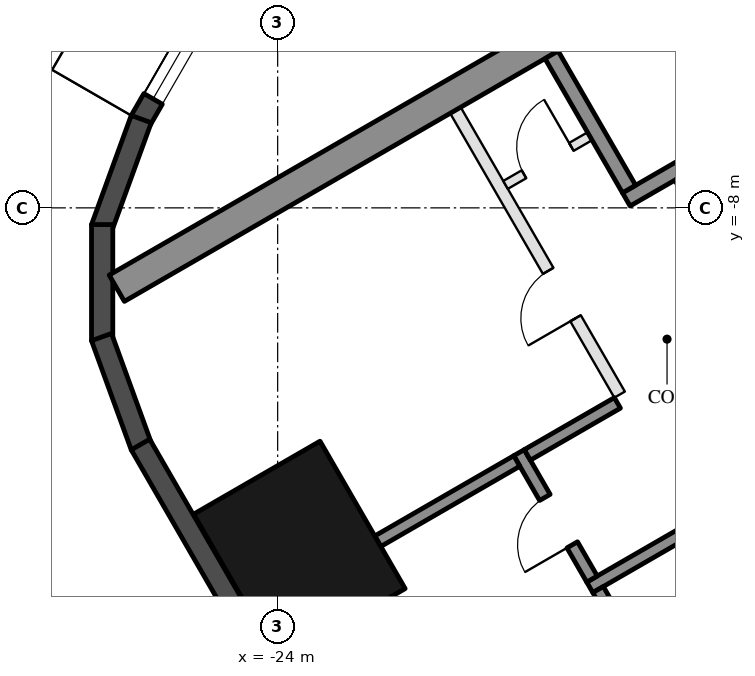
"""IFC4 building model, lengths in metres.
Left out: names, types, materials, properties, quantities, classifications, styles, units other than length and angle.
Written with IfcOpenShell. Run it as: python <this file> out.ifc"""

import sys

from ifc_helpers import new_model, si_unit, direction, frame, frame_2d, origin, origin_2d, place, context, subcontext, project, spatial, rectangle, hollow_rectangle, extrude, element, fill, save


model = new_model("IFC4")
c1 = context("Model", 3, precision=1e-05, world=origin(), true_north=direction((0.0, 1.0)))
c2 = subcontext(c1, "Body", "Model", "MODEL_VIEW")
j1 = project(units=[si_unit("LENGTHUNIT", "METRE"), si_unit("PLANEANGLEUNIT", "RADIAN")], contexts=[c1])
p1 = place(None, origin())
s1 = spatial("IfcSite", under=j1, at=p1, CompositionType="ELEMENT")
p2 = place(p1, origin())
s2 = spatial("IfcBuilding", under=s1, at=p2, CompositionType="ELEMENT")
p3 = place(p2, frame((0.0, 0.0, 109.4)))
s3 = spatial("IfcBuildingStorey", under=s2, at=p3, CompositionType="ELEMENT", Elevation=109.4)
p4 = place(p3, frame((-23.643, -13.65, 0.0), z_axis=(0.0, 0.0, 1.0), x_axis=(-0.5, 0.866025403784, 0.0)))
e1 = element("IfcColumn", 1, at=p4, inside=s3, PredefinedType="COLUMN", context=c2, shape_type="SweptSolid", body=[
    extrude(hollow_rectangle(XDim=2.8, YDim=2.4, WallThickness=0.07, at=origin_2d()), origin(), (0.0, 0.0, 1.0), 3.7),
])
p5 = place(p3, frame((-24.299, -3.176, 0.0), z_axis=(0.0, 0.0, 1.0), x_axis=(-0.500028278809, -0.866009076391, 0.0)))
e2 = element("IfcWall", 2, at=p5, inside=s3, PredefinedType="SOLIDWALL", context=c2, shape_type="SweptSolid", body=[
    extrude(rectangle(XDim=3.916, YDim=0.35, at=frame_2d((1.958, 0.0))), origin(), (0.0, 0.0, 1.0), 3.55),
])
p6 = place(p5, frame((1.7, 0.0, 0.3)))
e3 = element("IfcOpeningElement", 3, at=p6, cuts=e2, PredefinedType="OPENING", context=c2, shape_type="SweptSolid", body=[
    extrude(rectangle(XDim=1.8, YDim=2.65, at=frame_2d((0.9, 1.325))), frame((0.0, 0.185, 0.0), z_axis=(0.0, -1.0, 0.0), x_axis=(1.0, 0.0, 0.0)), (0.0, 0.0, 1.0), 0.37),
])
for number, where, z_axis, x_axis in (
    (4, (-26.244, -6.54, 0.0), (0.0, 0.0, 1.0), (-0.342, -0.94, 0.0)),
    (5, (-26.886, -8.275, 0.0), (0.0, 0.0, 1.0), (0.0, -1.0, 0.0)),
    (6, (-26.897, -10.125, 0.0), (0.0, 0.0, 1.0), (0.342, -0.94, 0.0)),
):
    element("IfcWall", number, at=place(p3, frame(where, z_axis=z_axis, x_axis=x_axis)), inside=s3, PredefinedType="SOLIDWALL", context=c2, shape_type="SweptSolid", body=[
        extrude(rectangle(XDim=1.91, YDim=0.35, at=frame_2d((0.955, 0.0))), origin(), (0.0, 0.0, 1.0), 3.55),
    ])
p7 = place(p3, frame((-26.257, -11.893, 0.0), z_axis=(0.0, 0.0, 1.0), x_axis=(0.500018773155, -0.866014564827, 0.0)))
e7 = element("IfcWall", 7, at=p7, inside=s3, PredefinedType="SOLIDWALL", context=c2, shape_type="SweptSolid", body=[
    extrude(rectangle(XDim=5.658, YDim=0.35, at=frame_2d((2.829, 0.0))), origin(), (0.0, 0.0, 1.0), 3.55),
])
for number, where, z_axis, x_axis in (
    (8, (-13.797, -1.903, 0.0), (0.0, 0.0, 1.0), (-0.866, -0.5, 0.0)),
    (9, (-8.547, -10.997, 0.0), (0.0, 0.0, 1.0), (-0.866, -0.5, 0.0)),
):
    element("IfcWall", number, at=place(p3, frame(where, z_axis=z_axis, x_axis=x_axis)), inside=s3, PredefinedType="SHEAR", context=c2, shape_type="SweptSolid", body=[
        extrude(rectangle(XDim=14.837, YDim=0.5, at=frame_2d((7.418, 0.0))), origin(), (0.0, 0.0, 1.0), 3.5),
    ])
p8 = place(p3, frame((-12.681, -4.636, 0.0), z_axis=(0.0, 0.0, 1.0), x_axis=(-0.866021702275, -0.500006411147, 0.0)))
e10 = element("IfcWall", 10, at=p8, inside=s3, PredefinedType="SHEAR", context=c2, shape_type="SweptSolid", body=[
    extrude(rectangle(XDim=6.45, YDim=0.25, at=frame_2d((3.225, 0.0))), origin(), (0.0, 0.0, 1.0), 3.5),
])
p9 = place(p8, frame((0.3, 0.0, 0.0)))
e11 = element("IfcOpeningElement", 11, at=p9, cuts=e10, PredefinedType="OPENING", context=c2, shape_type="SweptSolid", body=[
    extrude(rectangle(XDim=1.0, YDim=2.1, at=frame_2d((0.5, 1.05))), frame((0.0, 0.135, 0.0), z_axis=(0.0, -1.0, 0.0), x_axis=(1.0, 0.0, 0.0)), (0.0, 0.0, 1.0), 0.27),
])
p10 = place(p3, frame((-19.496, -5.482, 0.0), z_axis=(0.0, 0.0, 1.0), x_axis=(0.499990435942, -0.866030925526, 0.0)))
e12 = element("IfcWall", 12, at=p10, inside=s3, PredefinedType="SHEAR", context=c2, shape_type="SweptSolid", body=[
    extrude(rectangle(XDim=2.55, YDim=0.25, at=frame_2d((1.275, 0.0))), origin(), (0.0, 0.0, 1.0), 3.5),
])
p11 = place(p3, frame((-17.381, -7.495, 0.0), z_axis=(0.0, 0.0, 1.0), x_axis=(0.500011755427, -0.866018616679, 0.0)))
e13 = element("IfcWall", 13, at=p11, inside=s3, PredefinedType="SHEAR", context=c2, shape_type="SweptSolid", body=[
    extrude(rectangle(XDim=2.8, YDim=0.2, at=frame_2d((1.4, 0.0))), origin(), (0.0, 0.0, 1.0), 3.5),
])
p12 = place(p3, frame((-10.068, -9.162, 0.0), z_axis=(0.0, 0.0, 1.0), x_axis=(-0.866032725843, -0.499987317609, 0.0)))
e14 = element("IfcWall", 14, at=p12, inside=s3, PredefinedType="SHEAR", context=c2, shape_type="SweptSolid", body=[
    extrude(rectangle(XDim=10.16, YDim=0.2, at=frame_2d((5.08, 0.0))), origin(), (0.0, 0.0, 1.0), 3.5),
])
p13 = place(p12, frame((1.99, 0.0, 0.0)))
e15 = element("IfcOpeningElement", 15, at=p13, cuts=e14, PredefinedType="OPENING", context=c2, shape_type="SweptSolid", body=[
    extrude(rectangle(XDim=0.9, YDim=2.1, at=frame_2d((0.45, 1.05))), frame((0.0, 0.11, 0.0), z_axis=(0.0, -1.0, 0.0), x_axis=(1.0, 0.0, 0.0)), (0.0, 0.0, 1.0), 0.22),
])
p14 = place(p12, frame((7.07, 0.0, 0.0)))
e16 = element("IfcOpeningElement", 16, at=p14, cuts=e14, PredefinedType="OPENING", context=c2, shape_type="SweptSolid", body=[
    extrude(rectangle(XDim=0.9, YDim=2.1, at=frame_2d((0.45, 1.05))), frame((0.0, 0.11, 0.0), z_axis=(0.0, -1.0, 0.0), x_axis=(1.0, 0.0, 0.0)), (0.0, 0.0, 1.0), 0.22),
])
p15 = place(p3, frame((-20.031, -12.026, 0.0), z_axis=(0.0, 0.0, 1.0), x_axis=(0.500033551112, -0.866006032174, 0.0)))
e17 = element("IfcWall", 17, at=p15, inside=s3, PredefinedType="SHEAR", context=c2, shape_type="SweptSolid", body=[
    extrude(rectangle(XDim=2.4, YDim=0.2, at=frame_2d((1.2, 0.0))), origin(), (0.0, 0.0, 1.0), 3.5),
])
p16 = place(p15, frame((0.85, 0.0, 0.0)))
e18 = element("IfcOpeningElement", 18, at=p16, cuts=e17, PredefinedType="OPENING", context=c2, shape_type="SweptSolid", body=[
    extrude(rectangle(XDim=0.9, YDim=2.1, at=frame_2d((0.45, 1.05))), frame((0.0, 0.11, 0.0), z_axis=(0.0, -1.0, 0.0), x_axis=(1.0, 0.0, 0.0)), (0.0, 0.0, 1.0), 0.22),
])
p17 = place(p3, frame((-18.413, -11.208, 0.0), z_axis=(0.0, 0.0, 1.0), x_axis=(-0.866038183914, -0.499977863513, 0.0)))
e19 = element("IfcWall", 19, at=p17, inside=s3, PredefinedType="SHEAR", context=c2, shape_type="SweptSolid", body=[
    extrude(rectangle(XDim=1.71, YDim=0.2, at=frame_2d((0.855, 0.0))), origin(), (0.0, 0.0, 1.0), 3.5),
])
p18 = place(p3, frame((-18.73, -14.278, 0.0), z_axis=(0.0, 0.0, 1.0), x_axis=(0.50002537861, -0.866010750942, 0.0)))
e20 = element("IfcWall", 20, at=p18, inside=s3, PredefinedType="SHEAR", context=c2, shape_type="SweptSolid", body=[
    extrude(rectangle(XDim=2.0, YDim=0.2, at=frame_2d((1.0, 0.0))), origin(), (0.0, 0.0, 1.0), 3.5),
])
p19 = place(p3, frame((-20.067, -12.163, 0.0), z_axis=(0.0, 0.0, 1.0), x_axis=(-0.866060851709, -0.499938597367, 0.0)))
e21 = element("IfcWall", 21, at=p19, inside=s3, PredefinedType="SHEAR", context=c2, shape_type="SweptSolid", body=[
    extrude(rectangle(XDim=2.64, YDim=0.2, at=frame_2d((1.32, 0.0))), origin(), (0.0, 0.0, 1.0), 3.5),
])
p20 = place(p3, frame((-21.076, -6.395, 0.0), z_axis=(0.0, 0.0, 1.0), x_axis=(0.50001468107, -0.866016927499, 0.0)))
e22 = element("IfcWall", 22, at=p20, inside=s3, PredefinedType="PARTITIONING", context=c2, shape_type="SweptSolid", body=[
    extrude(rectangle(XDim=5.4, YDim=0.2, at=frame_2d((2.7, 0.0))), origin(), (0.0, 0.0, 1.0), 3.5),
])
p21 = place(p20, frame((3.05, 0.0, 0.0)))
e23 = element("IfcOpeningElement", 23, at=p21, cuts=e22, PredefinedType="OPENING", context=c2, shape_type="SweptSolid", body=[
    extrude(rectangle(XDim=0.9, YDim=2.1, at=frame_2d((0.45, 1.05))), frame((0.0, 0.11, 0.0), z_axis=(0.0, -1.0, 0.0), x_axis=(1.0, 0.0, 0.0)), (0.0, 0.0, 1.0), 0.22),
])
p22 = place(p3, frame((-18.866, -6.822, 0.0), z_axis=(0.0, 0.0, 1.0), x_axis=(-0.866028054938, -0.499995408039, 0.0)))
e24 = element("IfcWall", 24, at=p22, inside=s3, PredefinedType="PARTITIONING", context=c2, shape_type="SweptSolid", body=[
    extrude(rectangle(XDim=1.6, YDim=0.15, at=frame_2d((0.8, 0.0))), origin(), (0.0, 0.0, 1.0), 3.5),
])
p23 = place(p22, frame((0.35, 0.0, 0.0)))
e25 = element("IfcOpeningElement", 25, at=p23, cuts=e24, PredefinedType="OPENING", context=c2, shape_type="SweptSolid", body=[
    extrude(rectangle(XDim=0.9, YDim=2.1, at=frame_2d((0.45, 1.05))), frame((0.0, 0.085, 0.0), z_axis=(0.0, -1.0, 0.0), x_axis=(1.0, 0.0, 0.0)), (0.0, 0.0, 1.0), 0.17),
])
p24 = place(p6, origin())
e26 = element("IfcWindow", 26, at=p24, inside=s3, PartitioningType="SINGLE_PANEL", PredefinedType="WINDOW", context=c2, shape_type="SweptSolid", body=[
    extrude(rectangle(XDim=1.8, YDim=2.65, at=frame_2d((0.9, 1.325))), frame((0.0, 0.03, 0.0), z_axis=(0.0, -1.0, 0.0), x_axis=(1.0, 0.0, 0.0)), (0.0, 0.0, 1.0), 0.06),
])
fill(e3, e26)
p25 = place(p23, frame((0.9, 0.0, 0.0), z_axis=(0.0, 0.0, 1.0), x_axis=(-1.0, 0.0, 0.0)))
e27 = element("IfcDoor", 27, at=p25, inside=s3, OperationType="SINGLE_SWING_RIGHT", PredefinedType="DOOR", context=c2, shape_type="SweptSolid", body=[
    extrude(rectangle(XDim=0.9, YDim=2.1, at=frame_2d((0.45, 1.05))), frame((0.0, 0.025, 0.0), z_axis=(0.0, -1.0, 0.0), x_axis=(1.0, 0.0, 0.0)), (0.0, 0.0, 1.0), 0.05),
])
fill(e25, e27)
p26 = place(p16, frame((0.9, 0.0, 0.0), z_axis=(0.0, 0.0, 1.0), x_axis=(-1.0, 0.0, 0.0)))
e28 = element("IfcDoor", 28, at=p26, inside=s3, OperationType="SINGLE_SWING_LEFT", PredefinedType="DOOR", context=c2, shape_type="SweptSolid", body=[
    extrude(rectangle(XDim=0.9, YDim=2.1, at=frame_2d((0.45, 1.05))), frame((0.0, 0.025, 0.0), z_axis=(0.0, -1.0, 0.0), x_axis=(1.0, 0.0, 0.0)), (0.0, 0.0, 1.0), 0.05),
])
fill(e18, e28)
p27 = place(p21, frame((0.9, 0.0, 0.0), z_axis=(0.0, 0.0, 1.0), x_axis=(-1.0, 0.0, 0.0)))
e29 = element("IfcDoor", 29, at=p27, inside=s3, OperationType="SINGLE_SWING_LEFT", PredefinedType="DOOR", context=c2, shape_type="SweptSolid", body=[
    extrude(rectangle(XDim=0.9, YDim=2.1, at=frame_2d((0.45, 1.05))), frame((0.0, 0.025, 0.0), z_axis=(0.0, -1.0, 0.0), x_axis=(1.0, 0.0, 0.0)), (0.0, 0.0, 1.0), 0.05),
])
fill(e23, e29)
save(model, sys.argv[1])
